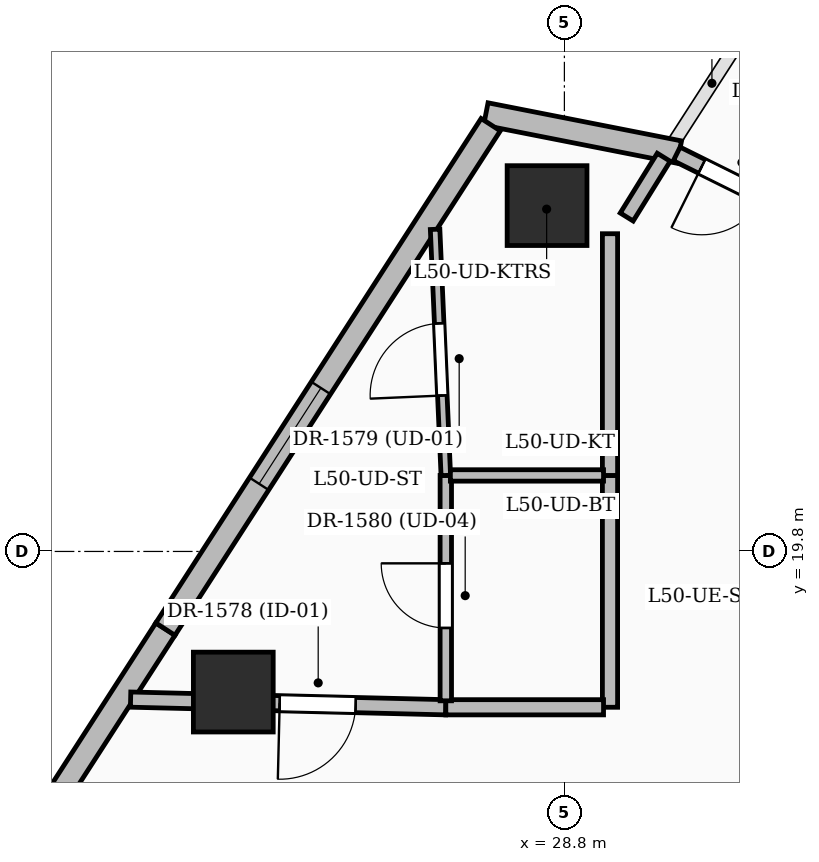
"""IFC4 building model, lengths in metres.
Left out: names, types, materials, properties, quantities, classifications, styles, units other than length and angle.
Written with IfcOpenShell. Run it as: python <this file> out.ifc"""

import sys

from ifc_helpers import new_model, si_unit, direction, frame, frame_2d, origin, origin_2d, place, context, subcontext, project, spatial, rectangle, extrude, element, fill, save


model = new_model("IFC4")
c1 = context("Model", 3, precision=1e-05, world=origin(), true_north=direction((0.0, 1.0)))
c2 = subcontext(c1, "Body", "Model", "MODEL_VIEW")
j1 = project(units=[si_unit("LENGTHUNIT", "METRE"), si_unit("PLANEANGLEUNIT", "RADIAN")], contexts=[c1])
p1 = place(None, origin())
s1 = spatial("IfcSite", under=j1, at=p1, CompositionType="ELEMENT")
p2 = place(p1, origin())
s2 = spatial("IfcBuilding", under=s1, at=p2, CompositionType="ELEMENT")
p3 = place(p2, frame((0.0, 0.0, 193.2)))
s3 = spatial("IfcBuildingStorey", under=s2, at=p3, CompositionType="ELEMENT", Elevation=193.2)
for number, where, z_axis, x_axis in (
    (1, (28.572, 24.35, 0.0), (0.0, 0.0, 1.0), (1.0, 0.0, 0.0)),
    (2, (24.444, 17.95, 0.0), (0.0, 0.0, 1.0), (1.0, 0.0, 0.0)),
):
    element("IfcColumn", number, at=place(p3, frame(where, z_axis=z_axis, x_axis=x_axis)), inside=s3, PredefinedType="COLUMN", context=c2, shape_type="SweptSolid", body=[
        extrude(rectangle(XDim=1.05, YDim=1.05, at=origin_2d()), origin(), (0.0, 0.0, 1.0), 3.6),
    ])
p4 = place(p3, frame((27.767, 25.555, 0.0), z_axis=(0.0, 0.0, 1.0), x_axis=(0.981183938234, -0.193075320412, 0.0)))
e3 = element("IfcWall", 3, at=p4, inside=s3, PredefinedType="SOLIDWALL", context=c2, shape_type="SweptSolid", body=[
    extrude(rectangle(XDim=2.595, YDim=0.3, at=frame_2d((1.297, 0.0))), origin(), (0.0, 0.0, 1.0), 2.525),
])
p5 = place(p3, frame((19.121, 11.911, 0.0), z_axis=(0.0, 0.0, 1.0), x_axis=(0.542005736819, 0.840374786185, 0.0)))
e4 = element("IfcWall", 4, at=p5, inside=s3, PredefinedType="SOLIDWALL", context=c2, shape_type="SweptSolid", body=[
    extrude(rectangle(XDim=8.172, YDim=0.3, at=frame_2d((4.086, 0.0))), origin(), (0.0, 0.0, 1.0), 3.3),
])
p6 = place(p5, frame((1.362, 0.0, 0.0)))
e5 = element("IfcOpeningElement", 5, at=p6, cuts=e4, PredefinedType="OPENING", context=c2, shape_type="SweptSolid", body=[
    extrude(rectangle(XDim=1.0, YDim=2.2, at=frame_2d((0.5, 1.1))), frame((0.0, 0.16, 0.0), z_axis=(0.0, -1.0, 0.0), x_axis=(1.0, 0.0, 0.0)), (0.0, 0.0, 1.0), 0.32),
])
p7 = place(p3, frame((23.551, 18.778, 0.0), z_axis=(0.0, 0.0, 1.0), x_axis=(0.542022645608, 0.840363880499, 0.0)))
e6 = element("IfcWall", 6, at=p7, inside=s3, PredefinedType="SOLIDWALL", context=c2, shape_type="SweptSolid", body=[
    extrude(rectangle(XDim=7.897, YDim=0.3, at=frame_2d((3.948, 0.0))), origin(), (0.0, 0.0, 1.0), 3.3),
])
p8 = place(p7, frame((2.275, 0.0, 0.6)))
e7 = element("IfcOpeningElement", 7, at=p8, cuts=e6, PredefinedType="OPENING", context=c2, shape_type="SweptSolid", body=[
    extrude(rectangle(XDim=1.5, YDim=2.1, at=frame_2d((0.75, 1.05))), frame((0.0, 0.16, 0.0), z_axis=(0.0, -1.0, 0.0), x_axis=(1.0, 0.0, 0.0)), (0.0, 0.0, 1.0), 0.32),
])
p9 = place(p3, frame((27.24, 17.75, 0.0), z_axis=(0.0, 0.0, 1.0), x_axis=(-0.999703110384, 0.024365776975, 0.0)))
e8 = element("IfcWall", 8, at=p9, inside=s3, PredefinedType="PARTITIONING", context=c2, shape_type="SweptSolid", body=[
    extrude(rectangle(XDim=4.148, YDim=0.2, at=frame_2d((2.074, 0.0))), origin(), (0.0, 0.0, 1.0), 2.721),
])
p10 = place(p9, frame((1.186, 0.0, 0.0)))
e9 = element("IfcOpeningElement", 9, at=p10, cuts=e8, PredefinedType="OPENING", context=c2, shape_type="SweptSolid", body=[
    extrude(rectangle(XDim=1.0, YDim=2.2, at=frame_2d((0.5, 1.1))), frame((0.0, 0.11, 0.0), z_axis=(0.0, -1.0, 0.0), x_axis=(1.0, 0.0, 0.0)), (0.0, 0.0, 1.0), 0.22),
])
p11 = place(p3, frame((29.4, 20.8, 0.0), z_axis=(0.0, 0.0, 1.0), x_axis=(0.0, -1.0, 0.0)))
e10 = element("IfcWall", 10, at=p11, inside=s3, PredefinedType="PARTITIONING", context=c2, shape_type="SweptSolid", body=[
    extrude(rectangle(XDim=3.05, YDim=0.2, at=frame_2d((1.525, 0.0))), origin(), (0.0, 0.0, 1.0), 2.721),
])
p12 = place(p3, frame((29.315, 17.75, 0.0), z_axis=(0.0, 0.0, 1.0), x_axis=(-1.0, 0.0, 0.0)))
e11 = element("IfcWall", 11, at=p12, inside=s3, PredefinedType="PARTITIONING", context=c2, shape_type="SweptSolid", body=[
    extrude(rectangle(XDim=2.075, YDim=0.2, at=frame_2d((1.038, 0.0))), origin(), (0.0, 0.0, 1.0), 2.721),
])
p13 = place(p3, frame((29.4, 23.98, 0.0), z_axis=(0.0, 0.0, 1.0), x_axis=(0.0, -1.0, 0.0)))
e12 = element("IfcWall", 12, at=p13, inside=s3, PredefinedType="PARTITIONING", context=c2, shape_type="SweptSolid", body=[
    extrude(rectangle(XDim=3.18, YDim=0.2, at=frame_2d((1.59, 0.0))), origin(), (0.0, 0.0, 1.0), 2.414),
])
p14 = place(p3, frame((30.107, 24.986, 0.0), z_axis=(0.0, 0.0, 1.0), x_axis=(-0.526481863985, -0.850186360097, 0.0)))
e13 = element("IfcWall", 13, at=p14, inside=s3, PredefinedType="PARTITIONING", context=c2, shape_type="SweptSolid", body=[
    extrude(rectangle(XDim=0.925, YDim=0.2, at=frame_2d((0.462, 0.0))), origin(), (0.0, 0.0, 1.0), 3.3),
])
p15 = place(p3, frame((31.874, 24.238, 0.0), z_axis=(0.0, 0.0, 1.0), x_axis=(-0.895738971374, 0.444580358497, 0.0)))
e14 = element("IfcWall", 14, at=p15, inside=s3, PredefinedType="PARTITIONING", context=c2, shape_type="SweptSolid", body=[
    extrude(rectangle(XDim=1.781, YDim=0.2, at=frame_2d((0.891, 0.0))), origin(), (0.0, 0.0, 1.0), 3.3),
])
p16 = place(p15, frame((0.513, 0.0, 0.0)))
e15 = element("IfcOpeningElement", 15, at=p16, cuts=e14, PredefinedType="OPENING", context=c2, shape_type="SweptSolid", body=[
    extrude(rectangle(XDim=0.9, YDim=2.1, at=frame_2d((0.45, 1.05))), frame((0.0, 0.11, 0.0), z_axis=(0.0, -1.0, 0.0), x_axis=(1.0, 0.0, 0.0)), (0.0, 0.0, 1.0), 0.22),
])
p17 = place(p3, frame((27.24, 17.835, 0.0), z_axis=(0.0, 0.0, 1.0), x_axis=(0.0, 1.0, 0.0)))
e16 = element("IfcWall", 16, at=p17, inside=s3, PredefinedType="PARTITIONING", context=c2, shape_type="SweptSolid", body=[
    extrude(rectangle(XDim=2.965, YDim=0.15, at=frame_2d((1.482, 0.0))), origin(), (0.0, 0.0, 1.0), 2.721),
])
p18 = place(p17, frame((0.958, 0.0, 0.0)))
e17 = element("IfcOpeningElement", 17, at=p18, cuts=e16, PredefinedType="OPENING", context=c2, shape_type="SweptSolid", body=[
    extrude(rectangle(XDim=0.85, YDim=2.1, at=frame_2d((0.425, 1.05))), frame((0.0, 0.085, 0.0), z_axis=(0.0, -1.0, 0.0), x_axis=(1.0, 0.0, 0.0)), (0.0, 0.0, 1.0), 0.17),
])
p19 = place(p3, frame((27.24, 20.8, 0.0), z_axis=(0.0, 0.0, 1.0), x_axis=(-0.043463375339, 0.999055021009, 0.0)))
e18 = element("IfcWall", 18, at=p19, inside=s3, PredefinedType="PARTITIONING", context=c2, shape_type="SweptSolid", body=[
    extrude(rectangle(XDim=3.241, YDim=0.125, at=frame_2d((1.621, 0.0))), origin(), (0.0, 0.0, 1.0), 2.52),
])
p20 = place(p19, frame((1.052, 0.0, 0.0)))
e19 = element("IfcOpeningElement", 19, at=p20, cuts=e18, PredefinedType="OPENING", context=c2, shape_type="SweptSolid", body=[
    extrude(rectangle(XDim=0.95, YDim=2.2, at=frame_2d((0.475, 1.1))), frame((0.0, 0.072, 0.0), z_axis=(0.0, -1.0, 0.0), x_axis=(1.0, 0.0, 0.0)), (0.0, 0.0, 1.0), 0.145),
])
p21 = place(p3, frame((29.315, 20.8, 0.0), z_axis=(0.0, 0.0, 1.0), x_axis=(-1.0, 0.0, 0.0)))
e20 = element("IfcWall", 20, at=p21, inside=s3, PredefinedType="PARTITIONING", context=c2, shape_type="SweptSolid", body=[
    extrude(rectangle(XDim=2.015, YDim=0.15, at=frame_2d((1.007, 0.0))), origin(), (0.0, 0.0, 1.0), 3.3),
])
p22 = place(p8, origin())
e21 = element("IfcWindow", 21, at=p22, inside=s3, PartitioningType="SINGLE_PANEL", PredefinedType="WINDOW", context=c2, shape_type="SweptSolid", body=[
    extrude(rectangle(XDim=1.5, YDim=2.1, at=frame_2d((0.75, 1.05))), frame((0.0, 0.03, 0.0), z_axis=(0.0, -1.0, 0.0), x_axis=(1.0, 0.0, 0.0)), (0.0, 0.0, 1.0), 0.06),
])
fill(e7, e21)
p23 = place(p16, origin())
e22 = element("IfcDoor", 22, at=p23, inside=s3, OperationType="SINGLE_SWING_RIGHT", PredefinedType="DOOR", context=c2, shape_type="SweptSolid", body=[
    extrude(rectangle(XDim=0.9, YDim=2.1, at=frame_2d((0.45, 1.05))), frame((0.0, 0.025, 0.0), z_axis=(0.0, -1.0, 0.0), x_axis=(1.0, 0.0, 0.0)), (0.0, 0.0, 1.0), 0.05),
])
fill(e15, e22)
p24 = place(p10, origin())
e23 = element("IfcDoor", 23, at=p24, inside=s3, OperationType="SINGLE_SWING_RIGHT", PredefinedType="DOOR", context=c2, shape_type="SweptSolid", body=[
    extrude(rectangle(XDim=1.0, YDim=2.2, at=frame_2d((0.5, 1.1))), frame((0.0, 0.025, 0.0), z_axis=(0.0, -1.0, 0.0), x_axis=(1.0, 0.0, 0.0)), (0.0, 0.0, 1.0), 0.05),
])
fill(e9, e23)
p25 = place(p20, origin())
e24 = element("IfcDoor", 24, at=p25, inside=s3, OperationType="SINGLE_SWING_LEFT", PredefinedType="DOOR", context=c2, shape_type="SweptSolid", body=[
    extrude(rectangle(XDim=0.95, YDim=2.2, at=frame_2d((0.475, 1.1))), frame((0.0, 0.025, 0.0), z_axis=(0.0, -1.0, 0.0), x_axis=(1.0, 0.0, 0.0)), (0.0, 0.0, 1.0), 0.05),
])
fill(e19, e24)
p26 = place(p18, origin())
e25 = element("IfcDoor", 25, at=p26, inside=s3, OperationType="SINGLE_SWING_RIGHT", PredefinedType="DOOR", context=c2, shape_type="SweptSolid", body=[
    extrude(rectangle(XDim=0.85, YDim=2.1, at=frame_2d((0.425, 1.05))), frame((0.0, 0.025, 0.0), z_axis=(0.0, -1.0, 0.0), x_axis=(1.0, 0.0, 0.0)), (0.0, 0.0, 1.0), 0.05),
])
fill(e17, e25)
save(model, sys.argv[1])
